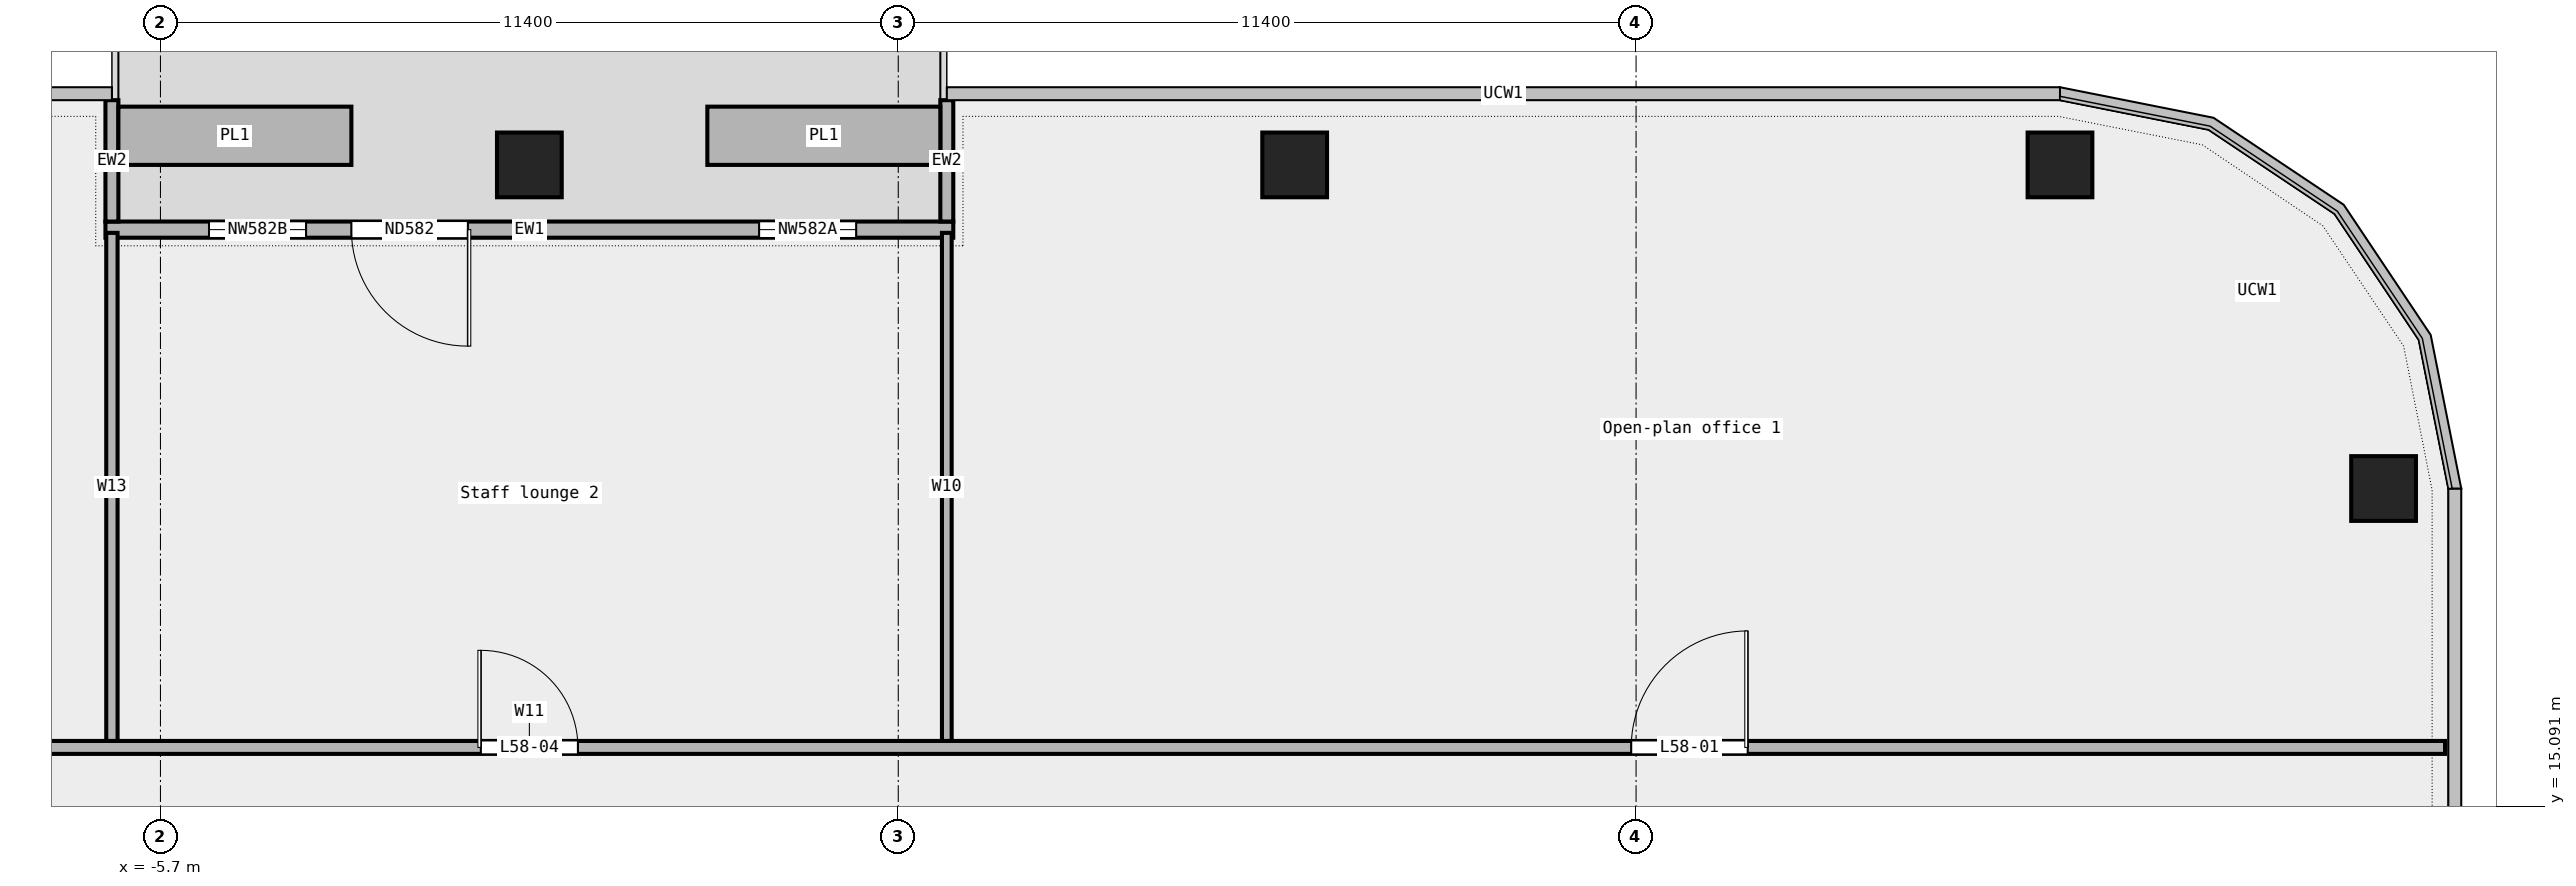
"""IFC4 building model, lengths in metres.
Left out: names, types, materials, properties, quantities, classifications, styles, units other than length and angle.
Written with IfcOpenShell. Run it as: python <this file> out.ifc"""

import sys

from ifc_helpers import new_model, si_unit, direction, frame, frame_2d, origin, origin_2d, place, context, subcontext, project, spatial, rectangle, extrude, element, fill, save


model = new_model("IFC4")
c1 = context("Model", 3, precision=1e-05, world=origin(), true_north=direction((0.0, 1.0)))
c2 = subcontext(c1, "Body", "Model", "MODEL_VIEW")
j1 = project(units=[si_unit("LENGTHUNIT", "METRE"), si_unit("PLANEANGLEUNIT", "RADIAN")], contexts=[c1])
p1 = place(None, origin())
s1 = spatial("IfcSite", under=j1, at=p1, CompositionType="ELEMENT")
p2 = place(p1, origin())
s2 = spatial("IfcBuilding", under=s1, at=p2, CompositionType="ELEMENT")
p3 = place(p2, frame((0.0, 0.0, 271.4)))
s3 = spatial("IfcBuildingStorey", under=s2, at=p3, CompositionType="ELEMENT", Elevation=271.4)
for number, where, z_axis, x_axis in (
    (1, (28.65, 20.0, 0.0), (0.0, 0.0, 1.0), (1.0, 0.0, 0.0)),
    (2, (23.65, 25.0, 0.0), (0.0, 0.0, 1.0), (1.0, 0.0, 0.0)),
    (3, (11.825, 25.0, 0.0), (0.0, 0.0, 1.0), (1.0, 0.0, 0.0)),
    (4, (0.0, 25.0, 0.0), (0.0, 0.0, 1.0), (1.0, 0.0, 0.0)),
):
    element("IfcColumn", number, at=place(p3, frame(where, z_axis=z_axis, x_axis=x_axis)), inside=s3, PredefinedType="COLUMN", context=c2, shape_type="SweptSolid", body=[
        extrude(rectangle(XDim=1.0, YDim=1.0, at=origin_2d()), origin(), (0.0, 0.0, 1.0), 3.6),
    ])
p4 = place(p3, frame((6.55, 24.0, 0.0), z_axis=(0.0, 0.0, 1.0), x_axis=(-1.0, 0.0, 0.0)))
e5 = element("IfcWall", 5, at=p4, inside=s3, PredefinedType="STANDARD", context=c2, shape_type="SweptSolid", body=[
    extrude(rectangle(XDim=13.1, YDim=0.25, at=frame_2d((6.55, 0.0))), origin(), (0.0, 0.0, 1.0), 3.6),
])
p5 = place(p4, frame((1.5, 0.0, 0.45)))
e6 = element("IfcOpeningElement", 6, at=p5, cuts=e5, PredefinedType="OPENING", context=c2, shape_type="SweptSolid", body=[
    extrude(rectangle(XDim=1.5, YDim=2.4, at=frame_2d((0.75, 1.2))), frame((0.0, 0.137, 0.0), z_axis=(0.0, -1.0, 0.0), x_axis=(1.0, 0.0, 0.0)), (0.0, 0.0, 1.0), 0.274),
])
p6 = place(p4, frame((7.5, 0.0, 0.0)))
e7 = element("IfcOpeningElement", 7, at=p6, cuts=e5, PredefinedType="OPENING", context=c2, shape_type="SweptSolid", body=[
    extrude(rectangle(XDim=1.8, YDim=2.4, at=frame_2d((0.9, 1.2))), frame((0.0, 0.137, 0.0), z_axis=(0.0, -1.0, 0.0), x_axis=(1.0, 0.0, 0.0)), (0.0, 0.0, 1.0), 0.274),
])
p7 = place(p4, frame((10.0, 0.0, 0.45)))
e8 = element("IfcOpeningElement", 8, at=p7, cuts=e5, PredefinedType="OPENING", context=c2, shape_type="SweptSolid", body=[
    extrude(rectangle(XDim=1.5, YDim=2.4, at=frame_2d((0.75, 1.2))), frame((0.0, 0.137, 0.0), z_axis=(0.0, -1.0, 0.0), x_axis=(1.0, 0.0, 0.0)), (0.0, 0.0, 1.0), 0.274),
])
for number, where, z_axis, x_axis in (
    (9, (6.45, 26.0, 0.0), (0.0, 0.0, 1.0), (0.0, -1.0, 0.0)),
    (10, (-6.45, 26.0, 0.0), (0.0, 0.0, 1.0), (0.0, -1.0, 0.0)),
):
    element("IfcWall", number, at=place(p3, frame(where, z_axis=z_axis, x_axis=x_axis)), inside=s3, PredefinedType="STANDARD", context=c2, shape_type="SweptSolid", body=[
        extrude(rectangle(XDim=1.875, YDim=0.2, at=frame_2d((0.938, 0.0))), origin(), (0.0, 0.0, 1.0), 3.6),
    ])
for number, where, z_axis, x_axis in (
    (11, (6.35, 25.45, 0.0), (0.0, 0.0, 1.0), (-1.0, 0.0, 0.0)),
    (12, (-2.75, 25.45, 0.0), (0.0, 0.0, 1.0), (-1.0, 0.0, 0.0)),
):
    element("IfcWall", number, at=place(p3, frame(where, z_axis=z_axis, x_axis=x_axis)), inside=s3, PredefinedType="STANDARD", context=c2, shape_type="SweptSolid", body=[
        extrude(rectangle(XDim=3.6, YDim=0.9, at=frame_2d((1.8, 0.0))), origin(), (0.0, 0.0, 1.0), 0.7),
    ])
p8 = place(p3, frame((-29.6, 16.0, 0.0), z_axis=(0.0, 0.0, 1.0), x_axis=(1.0, 0.0, 0.0)))
e13 = element("IfcWall", 13, at=p8, inside=s3, PredefinedType="PARTITIONING", context=c2, shape_type="SweptSolid", body=[
    extrude(rectangle(XDim=59.2, YDim=0.2, at=frame_2d((29.6, 0.0))), origin(), (0.0, 0.0, 1.0), 3.6),
])
p9 = place(p8, frame((46.625, 0.0, 0.0)))
e14 = element("IfcOpeningElement", 14, at=p9, cuts=e13, PredefinedType="OPENING", context=c2, shape_type="SweptSolid", body=[
    extrude(rectangle(XDim=1.8, YDim=2.1, at=frame_2d((0.9, 1.05))), frame((0.0, 0.112, 0.0), z_axis=(0.0, -1.0, 0.0), x_axis=(1.0, 0.0, 0.0)), (0.0, 0.0, 1.0), 0.224),
])
p10 = place(p8, frame((28.85, 0.0, 0.0)))
e15 = element("IfcOpeningElement", 15, at=p10, cuts=e13, PredefinedType="OPENING", context=c2, shape_type="SweptSolid", body=[
    extrude(rectangle(XDim=1.5, YDim=2.1, at=frame_2d((0.75, 1.05))), frame((0.0, 0.112, 0.0), z_axis=(0.0, -1.0, 0.0), x_axis=(1.0, 0.0, 0.0)), (0.0, 0.0, 1.0), 0.224),
])
p11 = place(p8, frame((4.5, 0.0, 0.0)))
e16 = element("IfcOpeningElement", 16, at=p11, cuts=e13, PredefinedType="OPENING", context=c2, shape_type="SweptSolid", body=[
    extrude(rectangle(XDim=1.2, YDim=2.1, at=frame_2d((0.6, 1.05))), frame((0.0, 0.112, 0.0), z_axis=(0.0, -1.0, 0.0), x_axis=(1.0, 0.0, 0.0)), (0.0, 0.0, 1.0), 0.224),
])
p12 = place(p8, frame((15.825, 0.0, 0.0)))
e17 = element("IfcOpeningElement", 17, at=p12, cuts=e13, PredefinedType="OPENING", context=c2, shape_type="SweptSolid", body=[
    extrude(rectangle(XDim=1.5, YDim=2.1, at=frame_2d((0.75, 1.05))), frame((0.0, 0.112, 0.0), z_axis=(0.0, -1.0, 0.0), x_axis=(1.0, 0.0, 0.0)), (0.0, 0.0, 1.0), 0.224),
])
p13 = place(p3, frame((-6.45, 16.1, 0.0), z_axis=(0.0, 0.0, 1.0), x_axis=(0.0, 1.0, 0.0)))
e18 = element("IfcWall", 18, at=p13, inside=s3, PredefinedType="PARTITIONING", context=c2, shape_type="SweptSolid", body=[
    extrude(rectangle(XDim=7.85, YDim=0.175, at=frame_2d((3.925, 0.0))), origin(), (0.0, 0.0, 1.0), 3.6),
])
p14 = place(p3, frame((6.45, 16.1, 0.0), z_axis=(0.0, 0.0, 1.0), x_axis=(0.0, 1.0, 0.0)))
e19 = element("IfcWall", 19, at=p14, inside=s3, PredefinedType="PARTITIONING", context=c2, shape_type="SweptSolid", body=[
    extrude(rectangle(XDim=7.85, YDim=0.15, at=frame_2d((3.925, 0.0))), origin(), (0.0, 0.0, 1.0), 3.6),
])
p15 = place(p5, origin())
e20 = element("IfcWindow", 20, at=p15, inside=s3, PartitioningType="SINGLE_PANEL", PredefinedType="WINDOW", context=c2, shape_type="SweptSolid", body=[
    extrude(rectangle(XDim=1.5, YDim=2.4, at=frame_2d((0.75, 1.2))), frame((0.0, 0.03, 0.0), z_axis=(0.0, -1.0, 0.0), x_axis=(1.0, 0.0, 0.0)), (0.0, 0.0, 1.0), 0.06),
])
fill(e6, e20)
p16 = place(p6, origin())
e21 = element("IfcDoor", 21, at=p16, inside=s3, OperationType="DOUBLE_DOOR_SINGLE_SWING", PredefinedType="DOOR", context=c2, shape_type="SweptSolid", body=[
    extrude(rectangle(XDim=1.8, YDim=2.4, at=frame_2d((0.9, 1.2))), frame((0.0, 0.025, 0.0), z_axis=(0.0, -1.0, 0.0), x_axis=(1.0, 0.0, 0.0)), (0.0, 0.0, 1.0), 0.05),
])
fill(e7, e21)
p17 = place(p7, origin())
e22 = element("IfcWindow", 22, at=p17, inside=s3, PartitioningType="SINGLE_PANEL", PredefinedType="WINDOW", context=c2, shape_type="SweptSolid", body=[
    extrude(rectangle(XDim=1.5, YDim=2.4, at=frame_2d((0.75, 1.2))), frame((0.0, 0.03, 0.0), z_axis=(0.0, -1.0, 0.0), x_axis=(1.0, 0.0, 0.0)), (0.0, 0.0, 1.0), 0.06),
])
fill(e8, e22)
p18 = place(p9, origin())
e23 = element("IfcDoor", 23, at=p18, inside=s3, OperationType="DOUBLE_DOOR_SINGLE_SWING", PredefinedType="DOOR", context=c2, shape_type="SweptSolid", body=[
    extrude(rectangle(XDim=1.8, YDim=2.1, at=frame_2d((0.9, 1.05))), frame((0.0, 0.025, 0.0), z_axis=(0.0, -1.0, 0.0), x_axis=(1.0, 0.0, 0.0)), (0.0, 0.0, 1.0), 0.05),
])
fill(e14, e23)
p19 = place(p10, origin())
e24 = element("IfcDoor", 24, at=p19, inside=s3, OperationType="DOUBLE_DOOR_SINGLE_SWING", PredefinedType="DOOR", context=c2, shape_type="SweptSolid", body=[
    extrude(rectangle(XDim=1.5, YDim=2.1, at=frame_2d((0.75, 1.05))), frame((0.0, 0.025, 0.0), z_axis=(0.0, -1.0, 0.0), x_axis=(1.0, 0.0, 0.0)), (0.0, 0.0, 1.0), 0.05),
])
fill(e15, e24)
save(model, sys.argv[1])
